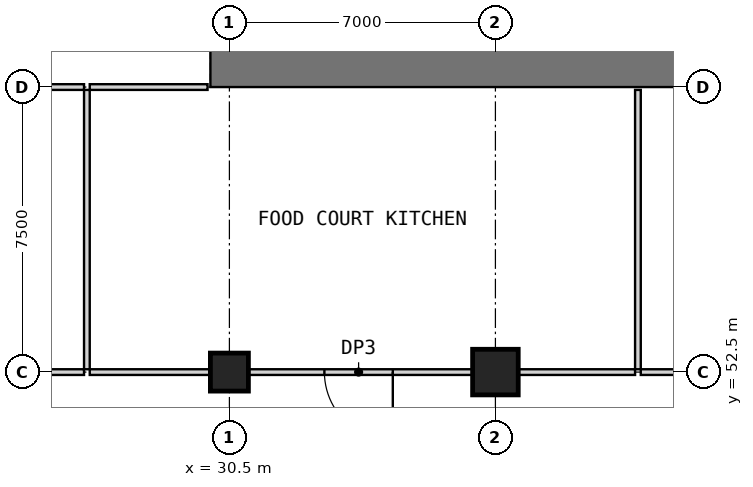
"""IFC4 building model, lengths in metres.
Left out: names, types, materials, properties, quantities, classifications, styles, units other than length and angle.
Written with IfcOpenShell. Run it as: python <this file> out.ifc"""

import sys

from ifc_helpers import new_model, si_unit, direction, frame, frame_2d, origin, origin_2d, place, context, subcontext, project, spatial, rectangle, extrude, element, fill, save


model = new_model("IFC4")
c1 = context("Model", 3, precision=1e-05, world=origin(), true_north=direction((0.0, 1.0)))
c2 = subcontext(c1, "Body", "Model", "MODEL_VIEW")
j1 = project(units=[si_unit("LENGTHUNIT", "METRE"), si_unit("PLANEANGLEUNIT", "RADIAN")], contexts=[c1])
p1 = place(None, origin())
s1 = spatial("IfcSite", under=j1, at=p1, CompositionType="ELEMENT")
p2 = place(p1, origin())
s2 = spatial("IfcBuilding", under=s1, at=p2, CompositionType="ELEMENT")
p3 = place(p2, frame((0.0, 0.0, 18.5)))
s3 = spatial("IfcBuildingStorey", under=s2, at=p3, CompositionType="ELEMENT", Elevation=18.5)
p4 = place(p3, frame((30.5, 52.5, 0.0), z_axis=(0.0, 0.0, 1.0), x_axis=(1.0, 0.0, 0.0)))
e1 = element("IfcColumn", 1, at=p4, inside=s3, PredefinedType="COLUMN", context=c2, shape_type="SweptSolid", body=[
    extrude(rectangle(XDim=1.0, YDim=1.0, at=origin_2d()), origin(), (0.0, 0.0, 1.0), 5.0),
])
p5 = place(p3, frame((37.5, 52.5, 0.0), z_axis=(0.0, 0.0, 1.0), x_axis=(1.0, 0.0, 0.0)))
e2 = element("IfcColumn", 2, at=p5, inside=s3, PredefinedType="COLUMN", context=c2, shape_type="SweptSolid", body=[
    extrude(rectangle(XDim=1.2, YDim=1.2, at=origin_2d()), origin(), (0.0, 0.0, 1.0), 5.0),
])
p6 = place(p3, frame((30.0, 60.5, 0.0), z_axis=(0.0, 0.0, 1.0), x_axis=(1.0, 0.0, 0.0)))
e3 = element("IfcWall", 3, at=p6, inside=s3, PredefinedType="SHEAR", context=c2, shape_type="SweptSolid", body=[
    extrude(rectangle(XDim=30.0, YDim=1.0, at=frame_2d((15.0, 0.0))), origin(), (0.0, 0.0, 1.0), 5.0),
])
p7 = place(p6, frame((21.9, 0.0, 0.0)))
e4 = element("IfcOpeningElement", 4, at=p7, cuts=e3, PredefinedType="OPENING", context=c2, shape_type="SweptSolid", body=[
    extrude(rectangle(XDim=1.8, YDim=2.1, at=frame_2d((0.9, 1.05))), frame((0.0, 0.51, 0.0), z_axis=(0.0, -1.0, 0.0), x_axis=(1.0, 0.0, 0.0)), (0.0, 0.0, 1.0), 1.02),
])
p8 = place(p6, frame((26.5, 0.0, 0.0)))
e5 = element("IfcOpeningElement", 5, at=p8, cuts=e3, PredefinedType="OPENING", context=c2, shape_type="SweptSolid", body=[
    extrude(rectangle(XDim=1.2, YDim=2.1, at=frame_2d((0.6, 1.05))), frame((0.0, 0.51, 0.0), z_axis=(0.0, -1.0, 0.0), x_axis=(1.0, 0.0, 0.0)), (0.0, 0.0, 1.0), 1.02),
])
p9 = place(p3, frame((23.6, 52.5, 0.0), z_axis=(0.0, 0.0, 1.0), x_axis=(1.0, 0.0, 0.0)))
e6 = element("IfcWall", 6, at=p9, inside=s3, PredefinedType="PARTITIONING", context=c2, shape_type="SweptSolid", body=[
    extrude(rectangle(XDim=3.075, YDim=0.15, at=frame_2d((1.538, 0.0))), origin(), (0.0, 0.0, 1.0), 4.7),
])
p10 = place(p3, frame((26.825, 52.5, 0.0), z_axis=(0.0, 0.0, 1.0), x_axis=(1.0, 0.0, 0.0)))
e7 = element("IfcWall", 7, at=p10, inside=s3, PredefinedType="PARTITIONING", context=c2, shape_type="SweptSolid", body=[
    extrude(rectangle(XDim=3.175, YDim=0.15, at=frame_2d((1.587, 0.0))), origin(), (0.0, 0.0, 1.0), 4.7),
])
p11 = place(p3, frame((36.9, 52.5, 0.0), z_axis=(0.0, 0.0, 1.0), x_axis=(-1.0, 0.0, 0.0)))
e8 = element("IfcWall", 8, at=p11, inside=s3, PredefinedType="PARTITIONING", context=c2, shape_type="SweptSolid", body=[
    extrude(rectangle(XDim=5.9, YDim=0.15, at=frame_2d((2.95, 0.0))), origin(), (0.0, 0.0, 1.0), 4.7),
])
p12 = place(p11, frame((2.1, 0.0, 0.0)))
e9 = element("IfcOpeningElement", 9, at=p12, cuts=e8, PredefinedType="OPENING", context=c2, shape_type="SweptSolid", body=[
    extrude(rectangle(XDim=1.8, YDim=2.4, at=frame_2d((0.9, 1.2))), frame((0.0, 0.085, 0.0), z_axis=(0.0, -1.0, 0.0), x_axis=(1.0, 0.0, 0.0)), (0.0, 0.0, 1.0), 0.17),
])
for number, where, z_axis, x_axis in (
    (10, (38.1, 52.5, 0.0), (0.0, 0.0, 1.0), (1.0, 0.0, 0.0)),
    (11, (41.325, 52.5, 0.0), (0.0, 0.0, 1.0), (1.0, 0.0, 0.0)),
    (12, (23.6, 60.0, 0.0), (0.0, 0.0, 1.0), (1.0, 0.0, 0.0)),
):
    element("IfcWall", number, at=place(p3, frame(where, z_axis=z_axis, x_axis=x_axis)), inside=s3, PredefinedType="PARTITIONING", context=c2, shape_type="SweptSolid", body=[
        extrude(rectangle(XDim=3.075, YDim=0.15, at=frame_2d((1.538, 0.0))), origin(), (0.0, 0.0, 1.0), 4.7),
    ])
p13 = place(p3, frame((26.825, 60.0, 0.0), z_axis=(0.0, 0.0, 1.0), x_axis=(1.0, 0.0, 0.0)))
e13 = element("IfcWall", 13, at=p13, inside=s3, PredefinedType="PARTITIONING", context=c2, shape_type="SweptSolid", body=[
    extrude(rectangle(XDim=3.1, YDim=0.15, at=frame_2d((1.55, 0.0))), origin(), (0.0, 0.0, 1.0), 4.7),
])
for number, where, z_axis, x_axis in (
    (14, (26.75, 52.575, 0.0), (0.0, 0.0, 1.0), (0.0, 1.0, 0.0)),
    (15, (41.25, 52.575, 0.0), (0.0, 0.0, 1.0), (0.0, 1.0, 0.0)),
):
    element("IfcWall", number, at=place(p3, frame(where, z_axis=z_axis, x_axis=x_axis)), inside=s3, PredefinedType="PARTITIONING", context=c2, shape_type="SweptSolid", body=[
        extrude(rectangle(XDim=7.35, YDim=0.15, at=frame_2d((3.675, 0.0))), origin(), (0.0, 0.0, 1.0), 4.7),
    ])
p14 = place(p12, origin())
e16 = element("IfcDoor", 16, at=p14, inside=s3, OperationType="SINGLE_SWING_LEFT", PredefinedType="DOOR", context=c2, shape_type="SweptSolid", body=[
    extrude(rectangle(XDim=1.8, YDim=2.4, at=frame_2d((0.9, 1.2))), frame((0.0, 0.025, 0.0), z_axis=(0.0, -1.0, 0.0), x_axis=(1.0, 0.0, 0.0)), (0.0, 0.0, 1.0), 0.05),
])
fill(e9, e16)
save(model, sys.argv[1])
